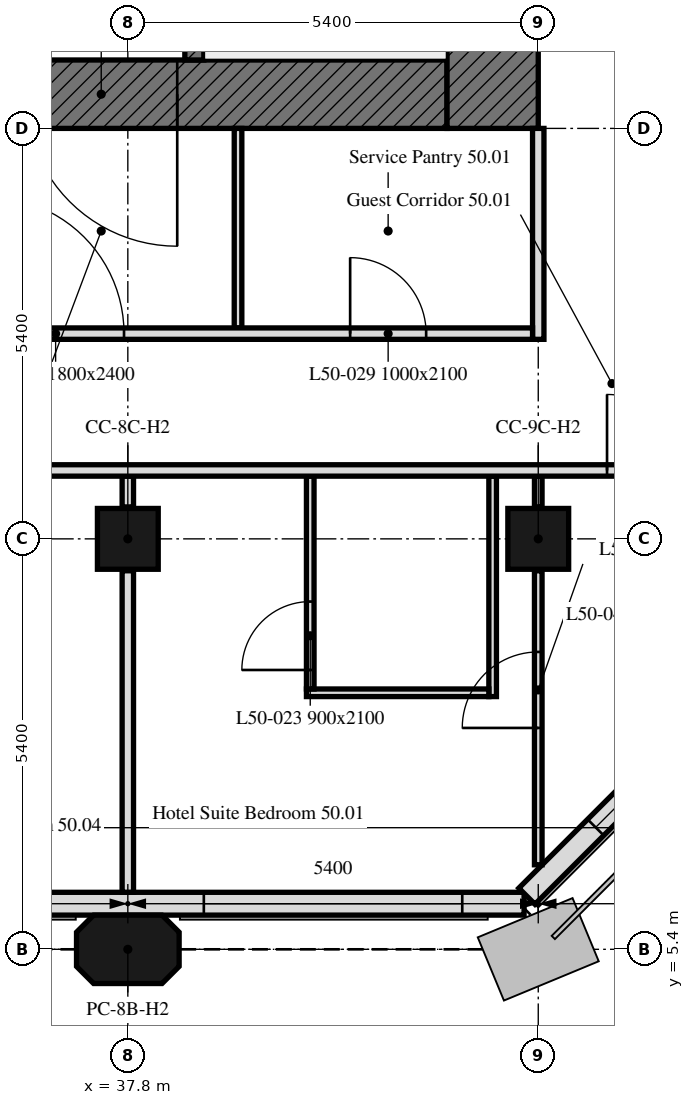
"""IFC4 building model, lengths in metres.
Left out: names, types, materials, properties, quantities, classifications, styles, units other than length and angle.
Written with IfcOpenShell. Run it as: python <this file> out.ifc"""

import sys

from ifc_helpers import new_model, si_unit, direction, frame, frame_2d, origin, origin_2d, place, context, subcontext, project, spatial, polyline, rectangle, outline, extrude, element, fill, save


model = new_model("IFC4")
c1 = context("Model", 3, precision=1e-05, world=origin(), true_north=direction((0.0, 1.0)))
c2 = subcontext(c1, "Body", "Model", "MODEL_VIEW")
j1 = project(units=[si_unit("LENGTHUNIT", "METRE"), si_unit("PLANEANGLEUNIT", "RADIAN")], contexts=[c1])
p1 = place(None, origin())
s1 = spatial("IfcSite", under=j1, at=p1, CompositionType="ELEMENT")
p2 = place(p1, origin())
s2 = spatial("IfcBuilding", under=s1, at=p2, CompositionType="ELEMENT")
p3 = place(p2, frame((0.0, 0.0, 203.8)))
s3 = spatial("IfcBuildingStorey", under=s2, at=p3, CompositionType="ELEMENT", Elevation=203.8)
p4 = place(p3, frame((37.8, 5.4, 0.0), z_axis=(0.0, 0.0, 1.0), x_axis=(1.0, 0.0, 0.0)))
e1 = element("IfcColumn", 1, at=p4, inside=s3, PredefinedType="COLUMN", context=c2, shape_type="SweptSolid", body=[
    extrude(outline(polyline([(-0.45, -0.45), (0.45, -0.45), (0.675, -0.225), (0.675, 0.225), (0.45, 0.45), (-0.45, 0.45), (-0.675, 0.225), (-0.675, -0.225), (-0.45, -0.45)])), origin(), (0.0, 0.0, 1.0), 3.0),
])
for number, where, z_axis, x_axis in (
    (2, (37.8, 10.8, 0.0), (0.0, 0.0, 1.0), (1.0, 0.0, 0.0)),
    (3, (43.2, 10.8, 0.0), (0.0, 0.0, 1.0), (1.0, 0.0, 0.0)),
):
    element("IfcColumn", number, at=place(p3, frame(where, z_axis=z_axis, x_axis=x_axis)), inside=s3, PredefinedType="COLUMN", context=c2, shape_type="SweptSolid", body=[
        extrude(rectangle(XDim=0.8, YDim=0.8, at=origin_2d()), origin(), (0.0, 0.0, 1.0), 3.0),
    ])
p5 = place(p3, frame((10.986, 6.0, 0.0), z_axis=(0.0, 0.0, 1.0), x_axis=(1.0, 0.0, 0.0)))
e4 = element("IfcWall", 4, at=p5, inside=s3, PredefinedType="SOLIDWALL", context=c2, shape_type="SweptSolid", body=[
    extrude(rectangle(XDim=32.027, YDim=0.3, at=frame_2d((16.014, 0.0))), origin(), (0.0, 0.0, 1.0), 3.0),
])
p6 = place(p5, frame((2.764, 0.0, 0.9)))
e5 = element("IfcOpeningElement", 5, at=p6, cuts=e4, PredefinedType="OPENING", context=c2, shape_type="SweptSolid", body=[
    extrude(rectangle(XDim=1.1, YDim=1.7, at=frame_2d((0.55, 0.85))), frame((0.0, 0.16, 0.0), z_axis=(0.0, -1.0, 0.0), x_axis=(1.0, 0.0, 0.0)), (0.0, 0.0, 1.0), 0.32),
])
p7 = place(p5, frame((6.214, 0.0, 0.9)))
e6 = element("IfcOpeningElement", 6, at=p7, cuts=e4, PredefinedType="OPENING", context=c2, shape_type="SweptSolid", body=[
    extrude(rectangle(XDim=3.4, YDim=1.7, at=frame_2d((1.7, 0.85))), frame((0.0, 0.16, 0.0), z_axis=(0.0, -1.0, 0.0), x_axis=(1.0, 0.0, 0.0)), (0.0, 0.0, 1.0), 0.32),
])
p8 = place(p5, frame((13.564, 0.0, 0.9)))
e7 = element("IfcOpeningElement", 7, at=p8, cuts=e4, PredefinedType="OPENING", context=c2, shape_type="SweptSolid", body=[
    extrude(rectangle(XDim=1.1, YDim=1.7, at=frame_2d((0.55, 0.85))), frame((0.0, 0.16, 0.0), z_axis=(0.0, -1.0, 0.0), x_axis=(1.0, 0.0, 0.0)), (0.0, 0.0, 1.0), 0.32),
])
p9 = place(p5, frame((17.014, 0.0, 0.9)))
e8 = element("IfcOpeningElement", 8, at=p9, cuts=e4, PredefinedType="OPENING", context=c2, shape_type="SweptSolid", body=[
    extrude(rectangle(XDim=3.4, YDim=1.7, at=frame_2d((1.7, 0.85))), frame((0.0, 0.16, 0.0), z_axis=(0.0, -1.0, 0.0), x_axis=(1.0, 0.0, 0.0)), (0.0, 0.0, 1.0), 0.32),
])
p10 = place(p5, frame((24.364, 0.0, 0.9)))
e9 = element("IfcOpeningElement", 9, at=p10, cuts=e4, PredefinedType="OPENING", context=c2, shape_type="SweptSolid", body=[
    extrude(rectangle(XDim=1.1, YDim=1.7, at=frame_2d((0.55, 0.85))), frame((0.0, 0.16, 0.0), z_axis=(0.0, -1.0, 0.0), x_axis=(1.0, 0.0, 0.0)), (0.0, 0.0, 1.0), 0.32),
])
p11 = place(p5, frame((27.814, 0.0, 0.9)))
e10 = element("IfcOpeningElement", 10, at=p11, cuts=e4, PredefinedType="OPENING", context=c2, shape_type="SweptSolid", body=[
    extrude(rectangle(XDim=3.4, YDim=1.7, at=frame_2d((1.7, 0.85))), frame((0.0, 0.16, 0.0), z_axis=(0.0, -1.0, 0.0), x_axis=(1.0, 0.0, 0.0)), (0.0, 0.0, 1.0), 0.32),
])
p12 = place(p3, frame((43.051, 6.099, 0.0), z_axis=(0.0, 0.0, 1.0), x_axis=(0.707106781187, 0.707106781187, 0.0)))
e11 = element("IfcWall", 11, at=p12, inside=s3, PredefinedType="SOLIDWALL", context=c2, shape_type="SweptSolid", body=[
    extrude(rectangle(XDim=6.86, YDim=0.3, at=frame_2d((3.43, 0.0))), origin(), (0.0, 0.0, 1.0), 3.0),
])
p13 = place(p12, frame((1.28, 0.0, 0.9)))
e12 = element("IfcOpeningElement", 12, at=p13, cuts=e11, PredefinedType="OPENING", context=c2, shape_type="SweptSolid", body=[
    extrude(rectangle(XDim=1.1, YDim=1.7, at=frame_2d((0.55, 0.85))), frame((0.0, 0.16, 0.0), z_axis=(0.0, -1.0, 0.0), x_axis=(1.0, 0.0, 0.0)), (0.0, 0.0, 1.0), 0.32),
])
p14 = place(p12, frame((4.48, 0.0, 0.9)))
e13 = element("IfcOpeningElement", 13, at=p14, cuts=e11, PredefinedType="OPENING", context=c2, shape_type="SweptSolid", body=[
    extrude(rectangle(XDim=1.1, YDim=1.7, at=frame_2d((0.55, 0.85))), frame((0.0, 0.16, 0.0), z_axis=(0.0, -1.0, 0.0), x_axis=(1.0, 0.0, 0.0)), (0.0, 0.0, 1.0), 0.32),
])
p15 = place(p3, frame((42.0, 16.65, 0.0), z_axis=(0.0, 0.0, 1.0), x_axis=(-1.0, 0.0, 0.0)))
e14 = element("IfcWall", 14, at=p15, inside=s3, PredefinedType="SOLIDWALL", context=c2, shape_type="SweptSolid", body=[
    extrude(rectangle(XDim=11.1, YDim=0.9, at=frame_2d((5.55, 0.0))), origin(), (0.0, 0.0, 1.0), 3.0),
])
p16 = place(p15, frame((3.55, 0.0, 0.0)))
e15 = element("IfcOpeningElement", 15, at=p16, cuts=e14, PredefinedType="OPENING", context=c2, shape_type="SweptSolid", body=[
    extrude(rectangle(XDim=2.0, YDim=2.4, at=frame_2d((1.0, 1.2))), frame((0.0, 0.45, 0.0), z_axis=(0.0, -1.0, 0.0), x_axis=(1.0, 0.0, 0.0)), (0.0, 0.0, 1.0), 0.9),
])
p17 = place(p3, frame((42.6, 32.4, 0.0), z_axis=(0.0, 0.0, 1.0), x_axis=(0.0, -1.0, 0.0)))
e16 = element("IfcWall", 16, at=p17, inside=s3, PredefinedType="SOLIDWALL", context=c2, shape_type="SweptSolid", body=[
    extrude(rectangle(XDim=16.2, YDim=1.2, at=frame_2d((8.1, 0.0))), origin(), (0.0, 0.0, 1.0), 3.0),
])
p18 = place(p3, frame((38.675, 17.1, 0.0), z_axis=(0.0, 0.0, 1.0), x_axis=(0.0, 1.0, 0.0)))
e17 = element("IfcWall", 17, at=p18, inside=s3, PredefinedType="SOLIDWALL", context=c2, shape_type="SweptSolid", body=[
    extrude(rectangle(XDim=14.4, YDim=0.25, at=frame_2d((7.2, 0.0))), origin(), (0.0, 0.0, 1.0), 3.0),
])
p19 = place(p18, frame((4.6, 0.0, 0.0)))
e18 = element("IfcOpeningElement", 18, at=p19, cuts=e17, PredefinedType="OPENING", context=c2, shape_type="SweptSolid", body=[
    extrude(rectangle(XDim=1.0, YDim=2.1, at=frame_2d((0.5, 1.05))), frame((0.0, 0.125, 0.0), z_axis=(0.0, -1.0, 0.0), x_axis=(1.0, 0.0, 0.0)), (0.0, 0.0, 1.0), 0.25),
])
p20 = place(p18, frame((7.062, 0.0, 0.0)))
e19 = element("IfcOpeningElement", 19, at=p20, cuts=e17, PredefinedType="OPENING", context=c2, shape_type="SweptSolid", body=[
    extrude(rectangle(XDim=1.2, YDim=2.1, at=frame_2d((0.6, 1.05))), frame((0.0, 0.125, 0.0), z_axis=(0.0, -1.0, 0.0), x_axis=(1.0, 0.0, 0.0)), (0.0, 0.0, 1.0), 0.25),
])
p21 = place(p18, frame((10.106, 0.0, 0.0)))
e20 = element("IfcOpeningElement", 20, at=p21, cuts=e17, PredefinedType="OPENING", context=c2, shape_type="SweptSolid", body=[
    extrude(rectangle(XDim=0.9, YDim=2.1, at=frame_2d((0.45, 1.05))), frame((0.0, 0.125, 0.0), z_axis=(0.0, -1.0, 0.0), x_axis=(1.0, 0.0, 0.0)), (0.0, 0.0, 1.0), 0.25),
])
p22 = place(p18, frame((12.048, 0.0, 0.0)))
e21 = element("IfcOpeningElement", 21, at=p22, cuts=e17, PredefinedType="OPENING", context=c2, shape_type="SweptSolid", body=[
    extrude(rectangle(XDim=0.9, YDim=2.1, at=frame_2d((0.45, 1.05))), frame((0.0, 0.125, 0.0), z_axis=(0.0, -1.0, 0.0), x_axis=(1.0, 0.0, 0.0)), (0.0, 0.0, 1.0), 0.25),
])
p23 = place(p18, frame((13.354, 0.0, 0.0)))
e22 = element("IfcOpeningElement", 22, at=p23, cuts=e17, PredefinedType="OPENING", context=c2, shape_type="SweptSolid", body=[
    extrude(rectangle(XDim=0.9, YDim=2.1, at=frame_2d((0.45, 1.05))), frame((0.0, 0.125, 0.0), z_axis=(0.0, -1.0, 0.0), x_axis=(1.0, 0.0, 0.0)), (0.0, 0.0, 1.0), 0.25),
])
p24 = place(p3, frame((37.8, 6.151, 0.0), z_axis=(0.0, 0.0, 1.0), x_axis=(0.0, 1.0, 0.0)))
e23 = element("IfcWall", 23, at=p24, inside=s3, PredefinedType="PARTITIONING", context=c2, shape_type="SweptSolid", body=[
    extrude(rectangle(XDim=4.229, YDim=0.15, at=frame_2d((2.115, 0.0))), origin(), (0.0, 0.0, 1.0), 3.0),
])
p25 = place(p3, frame((37.8, 11.22, 0.0), z_axis=(0.0, 0.0, 1.0), x_axis=(0.0, 1.0, 0.0)))
e24 = element("IfcWall", 24, at=p25, inside=s3, PredefinedType="PARTITIONING", context=c2, shape_type="SweptSolid", body=[
    extrude(rectangle(XDim=0.405, YDim=0.15, at=frame_2d((0.203, 0.0))), origin(), (0.0, 0.0, 1.0), 3.0),
])
p26 = place(p3, frame((43.2, 6.512, 0.0), z_axis=(0.0, 0.0, 1.0), x_axis=(0.0, 1.0, 0.0)))
e25 = element("IfcWall", 25, at=p26, inside=s3, PredefinedType="PARTITIONING", context=c2, shape_type="SweptSolid", body=[
    extrude(rectangle(XDim=3.868, YDim=0.1, at=frame_2d((1.934, 0.0))), origin(), (0.0, 0.0, 1.0), 3.0),
])
p27 = place(p26, frame((1.8, 0.0, 0.0)))
e26 = element("IfcOpeningElement", 26, at=p27, cuts=e25, PredefinedType="OPENING", context=c2, shape_type="SweptSolid", body=[
    extrude(rectangle(XDim=1.0, YDim=2.1, at=frame_2d((0.5, 1.05))), frame((0.0, 0.05, 0.0), z_axis=(0.0, -1.0, 0.0), x_axis=(1.0, 0.0, 0.0)), (0.0, 0.0, 1.0), 0.1),
])
p28 = place(p3, frame((43.2, 11.22, 0.0), z_axis=(0.0, 0.0, 1.0), x_axis=(0.0, 1.0, 0.0)))
e27 = element("IfcWall", 27, at=p28, inside=s3, PredefinedType="PARTITIONING", context=c2, shape_type="SweptSolid", body=[
    extrude(rectangle(XDim=0.405, YDim=0.1, at=frame_2d((0.203, 0.0))), origin(), (0.0, 0.0, 1.0), 3.0),
])
p29 = place(p3, frame((42.6, 11.625, 0.0), z_axis=(0.0, 0.0, 1.0), x_axis=(0.0, -1.0, 0.0)))
e28 = element("IfcWall", 28, at=p29, inside=s3, PredefinedType="PARTITIONING", context=c2, shape_type="SweptSolid", body=[
    extrude(rectangle(XDim=2.9, YDim=0.1, at=frame_2d((1.45, 0.0))), origin(), (0.0, 0.0, 1.0), 3.0),
])
p30 = place(p3, frame((42.55, 8.775, 0.0), z_axis=(0.0, 0.0, 1.0), x_axis=(-1.0, 0.0, 0.0)))
e29 = element("IfcWall", 29, at=p30, inside=s3, PredefinedType="PARTITIONING", context=c2, shape_type="SweptSolid", body=[
    extrude(rectangle(XDim=2.4, YDim=0.1, at=frame_2d((1.2, 0.0))), origin(), (0.0, 0.0, 1.0), 3.0),
])
p31 = place(p3, frame((40.2, 8.825, 0.0), z_axis=(0.0, 0.0, 1.0), x_axis=(0.0, 1.0, 0.0)))
e30 = element("IfcWall", 30, at=p31, inside=s3, PredefinedType="PARTITIONING", context=c2, shape_type="SweptSolid", body=[
    extrude(rectangle(XDim=2.8, YDim=0.1, at=frame_2d((1.4, 0.0))), origin(), (0.0, 0.0, 1.0), 3.0),
])
p32 = place(p31, frame((0.25, 0.0, 0.0)))
e31 = element("IfcOpeningElement", 31, at=p32, cuts=e30, PredefinedType="OPENING", context=c2, shape_type="SweptSolid", body=[
    extrude(rectangle(XDim=0.9, YDim=2.1, at=frame_2d((0.45, 1.05))), frame((0.0, 0.05, 0.0), z_axis=(0.0, -1.0, 0.0), x_axis=(1.0, 0.0, 0.0)), (0.0, 0.0, 1.0), 0.1),
])
p33 = place(p3, frame((6.151, 11.7, 0.0), z_axis=(0.0, 0.0, 1.0), x_axis=(1.0, 0.0, 0.0)))
e32 = element("IfcWall", 32, at=p33, inside=s3, PredefinedType="PARTITIONING", context=c2, shape_type="SweptSolid", body=[
    extrude(rectangle(XDim=41.698, YDim=0.15, at=frame_2d((20.849, 0.0))), origin(), (0.0, 0.0, 1.0), 3.0),
])
p34 = place(p33, frame((37.954, 0.0, 0.0)))
e33 = element("IfcOpeningElement", 33, at=p34, cuts=e32, PredefinedType="OPENING", context=c2, shape_type="SweptSolid", body=[
    extrude(rectangle(XDim=1.0, YDim=2.1, at=frame_2d((0.5, 1.05))), frame((0.0, 0.075, 0.0), z_axis=(0.0, -1.0, 0.0), x_axis=(1.0, 0.0, 0.0)), (0.0, 0.0, 1.0), 0.15),
])
p35 = place(p33, frame((6.849, 0.0, 0.0)))
e34 = element("IfcOpeningElement", 34, at=p35, cuts=e32, PredefinedType="OPENING", context=c2, shape_type="SweptSolid", body=[
    extrude(rectangle(XDim=1.0, YDim=2.1, at=frame_2d((0.5, 1.05))), frame((0.0, 0.075, 0.0), z_axis=(0.0, -1.0, 0.0), x_axis=(1.0, 0.0, 0.0)), (0.0, 0.0, 1.0), 0.15),
])
p36 = place(p33, frame((23.049, 0.0, 0.0)))
e35 = element("IfcOpeningElement", 35, at=p36, cuts=e32, PredefinedType="OPENING", context=c2, shape_type="SweptSolid", body=[
    extrude(rectangle(XDim=1.0, YDim=2.1, at=frame_2d((0.5, 1.05))), frame((0.0, 0.075, 0.0), z_axis=(0.0, -1.0, 0.0), x_axis=(1.0, 0.0, 0.0)), (0.0, 0.0, 1.0), 0.15),
])
p37 = place(p3, frame((39.25, 13.575, 0.0), z_axis=(0.0, 0.0, 1.0), x_axis=(0.0, 1.0, 0.0)))
e36 = element("IfcWall", 36, at=p37, inside=s3, PredefinedType="PARTITIONING", context=c2, shape_type="SweptSolid", body=[
    extrude(rectangle(XDim=2.625, YDim=0.1, at=frame_2d((1.312, 0.0))), origin(), (0.0, 0.0, 1.0), 3.0),
])
p38 = place(p3, frame((43.2, 16.2, 0.0), z_axis=(0.0, 0.0, 1.0), x_axis=(0.0, -1.0, 0.0)))
e37 = element("IfcWall", 37, at=p38, inside=s3, PredefinedType="PARTITIONING", context=c2, shape_type="SweptSolid", body=[
    extrude(rectangle(XDim=2.775, YDim=0.15, at=frame_2d((1.387, 0.0))), origin(), (0.0, 0.0, 1.0), 3.0),
])
p39 = place(p3, frame((6.151, 13.5, 0.0), z_axis=(0.0, 0.0, 1.0), x_axis=(1.0, 0.0, 0.0)))
e38 = element("IfcWall", 38, at=p39, inside=s3, PredefinedType="PARTITIONING", context=c2, shape_type="SweptSolid", body=[
    extrude(rectangle(XDim=36.974, YDim=0.15, at=frame_2d((18.487, 0.0))), origin(), (0.0, 0.0, 1.0), 3.0),
])
p40 = place(p39, frame((12.249, 0.0, 0.0)))
e39 = element("IfcOpeningElement", 39, at=p40, cuts=e38, PredefinedType="OPENING", context=c2, shape_type="SweptSolid", body=[
    extrude(rectangle(XDim=1.0, YDim=2.1, at=frame_2d((0.5, 1.05))), frame((0.0, 0.075, 0.0), z_axis=(0.0, -1.0, 0.0), x_axis=(1.0, 0.0, 0.0)), (0.0, 0.0, 1.0), 0.15),
])
p41 = place(p39, frame((18.816, 0.0, 0.0)))
e40 = element("IfcOpeningElement", 40, at=p41, cuts=e38, PredefinedType="OPENING", context=c2, shape_type="SweptSolid", body=[
    extrude(rectangle(XDim=1.0, YDim=2.1, at=frame_2d((0.5, 1.05))), frame((0.0, 0.075, 0.0), z_axis=(0.0, -1.0, 0.0), x_axis=(1.0, 0.0, 0.0)), (0.0, 0.0, 1.0), 0.15),
])
p42 = place(p39, frame((2.029, 0.0, 0.0)))
e41 = element("IfcOpeningElement", 41, at=p42, cuts=e38, PredefinedType="OPENING", context=c2, shape_type="SweptSolid", body=[
    extrude(rectangle(XDim=1.0, YDim=2.1, at=frame_2d((0.5, 1.05))), frame((0.0, 0.075, 0.0), z_axis=(0.0, -1.0, 0.0), x_axis=(1.0, 0.0, 0.0)), (0.0, 0.0, 1.0), 0.15),
])
p43 = place(p39, frame((27.374, 0.0, 0.0)))
e42 = element("IfcOpeningElement", 42, at=p43, cuts=e38, PredefinedType="OPENING", context=c2, shape_type="SweptSolid", body=[
    extrude(rectangle(XDim=1.0, YDim=2.1, at=frame_2d((0.5, 1.05))), frame((0.0, 0.075, 0.0), z_axis=(0.0, -1.0, 0.0), x_axis=(1.0, 0.0, 0.0)), (0.0, 0.0, 1.0), 0.15),
])
p44 = place(p39, frame((34.574, 0.0, 0.0)))
e43 = element("IfcOpeningElement", 43, at=p44, cuts=e38, PredefinedType="OPENING", context=c2, shape_type="SweptSolid", body=[
    extrude(rectangle(XDim=1.0, YDim=2.1, at=frame_2d((0.5, 1.05))), frame((0.0, 0.075, 0.0), z_axis=(0.0, -1.0, 0.0), x_axis=(1.0, 0.0, 0.0)), (0.0, 0.0, 1.0), 0.15),
])
p45 = place(p39, frame((7.924, 0.0, 0.0)))
e44 = element("IfcOpeningElement", 44, at=p45, cuts=e38, PredefinedType="OPENING", context=c2, shape_type="SweptSolid", body=[
    extrude(rectangle(XDim=1.0, YDim=2.1, at=frame_2d((0.5, 1.05))), frame((0.0, 0.075, 0.0), z_axis=(0.0, -1.0, 0.0), x_axis=(1.0, 0.0, 0.0)), (0.0, 0.0, 1.0), 0.15),
])
p46 = place(p39, frame((4.699, 0.0, 0.0)))
e45 = element("IfcOpeningElement", 45, at=p46, cuts=e38, PredefinedType="OPENING", context=c2, shape_type="SweptSolid", body=[
    extrude(rectangle(XDim=1.8, YDim=2.4, at=frame_2d((0.9, 1.2))), frame((0.0, 0.075, 0.0), z_axis=(0.0, -1.0, 0.0), x_axis=(1.0, 0.0, 0.0)), (0.0, 0.0, 1.0), 0.15),
])
p47 = place(p39, frame((29.799, 0.0, 0.0)))
e46 = element("IfcOpeningElement", 46, at=p47, cuts=e38, PredefinedType="OPENING", context=c2, shape_type="SweptSolid", body=[
    extrude(rectangle(XDim=1.8, YDim=2.4, at=frame_2d((0.9, 1.2))), frame((0.0, 0.075, 0.0), z_axis=(0.0, -1.0, 0.0), x_axis=(1.0, 0.0, 0.0)), (0.0, 0.0, 1.0), 0.15),
])
p48 = place(p11, origin())
e47 = element("IfcWindow", 47, at=p48, inside=s3, PartitioningType="SINGLE_PANEL", PredefinedType="WINDOW", context=c2, shape_type="SweptSolid", body=[
    extrude(rectangle(XDim=3.4, YDim=1.7, at=frame_2d((1.7, 0.85))), frame((0.0, 0.03, 0.0), z_axis=(0.0, -1.0, 0.0), x_axis=(1.0, 0.0, 0.0)), (0.0, 0.0, 1.0), 0.06),
])
fill(e10, e47)
p49 = place(p13, origin())
e48 = element("IfcWindow", 48, at=p49, inside=s3, PartitioningType="SINGLE_PANEL", PredefinedType="WINDOW", context=c2, shape_type="SweptSolid", body=[
    extrude(rectangle(XDim=1.1, YDim=1.7, at=frame_2d((0.55, 0.85))), frame((0.0, 0.03, 0.0), z_axis=(0.0, -1.0, 0.0), x_axis=(1.0, 0.0, 0.0)), (0.0, 0.0, 1.0), 0.06),
])
fill(e12, e48)
p50 = place(p16, origin())
e49 = element("IfcDoor", 49, at=p50, inside=s3, OperationType="DOUBLE_DOOR_SINGLE_SWING", PredefinedType="DOOR", context=c2, shape_type="SweptSolid", body=[
    extrude(rectangle(XDim=2.0, YDim=2.4, at=frame_2d((1.0, 1.2))), frame((0.0, 0.025, 0.0), z_axis=(0.0, -1.0, 0.0), x_axis=(1.0, 0.0, 0.0)), (0.0, 0.0, 1.0), 0.05),
])
fill(e15, e49)
p51 = place(p32, origin())
e50 = element("IfcDoor", 50, at=p51, inside=s3, OperationType="SINGLE_SWING_RIGHT", PredefinedType="DOOR", context=c2, shape_type="SweptSolid", body=[
    extrude(rectangle(XDim=0.9, YDim=2.1, at=frame_2d((0.45, 1.05))), frame((0.0, 0.025, 0.0), z_axis=(0.0, -1.0, 0.0), x_axis=(1.0, 0.0, 0.0)), (0.0, 0.0, 1.0), 0.05),
])
fill(e31, e50)
p52 = place(p44, origin())
e51 = element("IfcDoor", 51, at=p52, inside=s3, OperationType="SINGLE_SWING_RIGHT", PredefinedType="DOOR", context=c2, shape_type="SweptSolid", body=[
    extrude(rectangle(XDim=1.0, YDim=2.1, at=frame_2d((0.5, 1.05))), frame((0.0, 0.025, 0.0), z_axis=(0.0, -1.0, 0.0), x_axis=(1.0, 0.0, 0.0)), (0.0, 0.0, 1.0), 0.05),
])
fill(e43, e51)
p53 = place(p27, origin())
e52 = element("IfcDoor", 52, at=p53, inside=s3, OperationType="SINGLE_SWING_RIGHT", PredefinedType="DOOR", context=c2, shape_type="SweptSolid", body=[
    extrude(rectangle(XDim=1.0, YDim=2.1, at=frame_2d((0.5, 1.05))), frame((0.0, 0.025, 0.0), z_axis=(0.0, -1.0, 0.0), x_axis=(1.0, 0.0, 0.0)), (0.0, 0.0, 1.0), 0.05),
])
fill(e26, e52)
p54 = place(p34, origin())
e53 = element("IfcDoor", 53, at=p54, inside=s3, OperationType="SINGLE_SWING_LEFT", PredefinedType="DOOR", context=c2, shape_type="SweptSolid", body=[
    extrude(rectangle(XDim=1.0, YDim=2.1, at=frame_2d((0.5, 1.05))), frame((0.0, 0.025, 0.0), z_axis=(0.0, -1.0, 0.0), x_axis=(1.0, 0.0, 0.0)), (0.0, 0.0, 1.0), 0.05),
])
fill(e33, e53)
p55 = place(p47, origin())
e54 = element("IfcDoor", 54, at=p55, inside=s3, OperationType="DOUBLE_DOOR_SINGLE_SWING", PredefinedType="DOOR", context=c2, shape_type="SweptSolid", body=[
    extrude(rectangle(XDim=1.8, YDim=2.4, at=frame_2d((0.9, 1.2))), frame((0.0, 0.025, 0.0), z_axis=(0.0, -1.0, 0.0), x_axis=(1.0, 0.0, 0.0)), (0.0, 0.0, 1.0), 0.05),
])
fill(e46, e54)
save(model, sys.argv[1])
